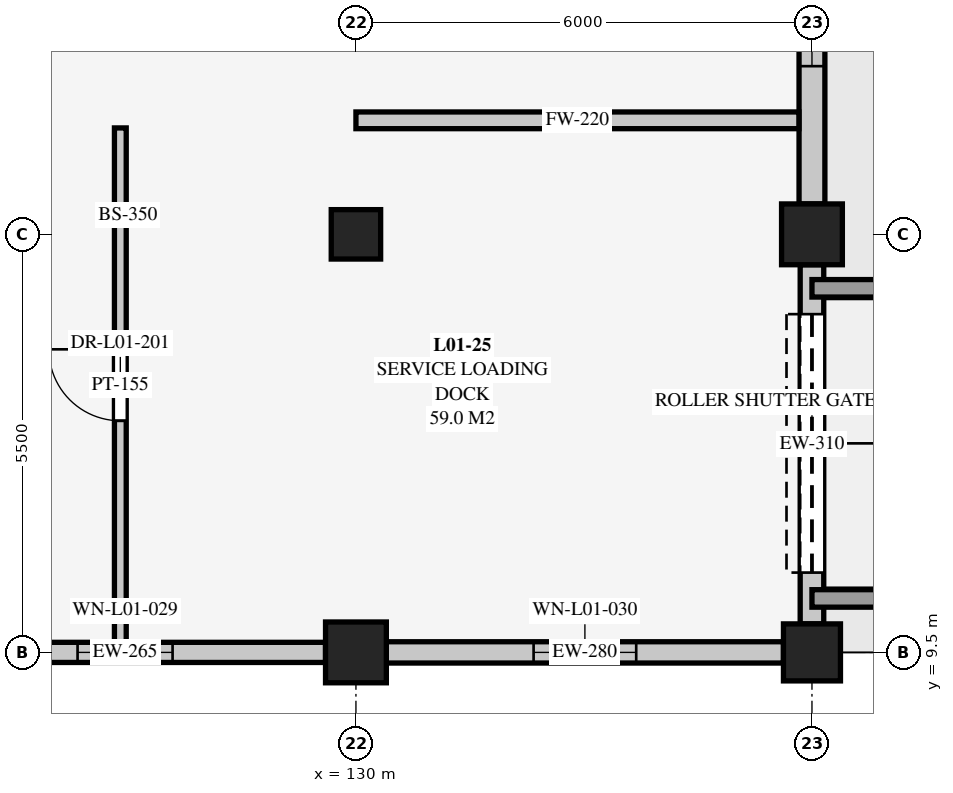
"""IFC4 building model, lengths in metres.
Left out: names, types, materials, properties, quantities, classifications, styles, units other than length and angle.
Written with IfcOpenShell. Run it as: python <this file> out.ifc"""

import sys

from ifc_helpers import new_model, si_unit, direction, frame, frame_2d, origin, origin_2d, place, context, subcontext, project, spatial, rectangle, extrude, element, fill, save


model = new_model("IFC4")
c1 = context("Model", 3, precision=1e-05, world=origin(), true_north=direction((0.0, 1.0)))
c2 = subcontext(c1, "Body", "Model", "MODEL_VIEW")
j1 = project(units=[si_unit("LENGTHUNIT", "METRE"), si_unit("PLANEANGLEUNIT", "RADIAN")], contexts=[c1])
p1 = place(None, origin())
s1 = spatial("IfcSite", under=j1, at=p1, CompositionType="ELEMENT")
p2 = place(p1, origin())
s2 = spatial("IfcBuilding", under=s1, at=p2, CompositionType="ELEMENT")
p3 = place(p2, origin())
s3 = spatial("IfcBuildingStorey", under=s2, at=p3, CompositionType="ELEMENT", Elevation=0.0)
p4 = place(p3, frame((130.0, 9.5, 0.0), z_axis=(0.0, 0.0, 1.0), x_axis=(1.0, 0.0, 0.0)))
e1 = element("IfcColumn", 1, at=p4, inside=s3, PredefinedType="COLUMN", context=c2, shape_type="SweptSolid", body=[
    extrude(rectangle(XDim=0.8, YDim=0.8, at=origin_2d()), origin(), (0.0, 0.0, 1.0), 4.5),
])
p5 = place(p3, frame((130.0, 15.0, 0.0), z_axis=(0.0, 0.0, 1.0), x_axis=(1.0, 0.0, 0.0)))
e2 = element("IfcColumn", 2, at=p5, inside=s3, PredefinedType="COLUMN", context=c2, shape_type="SweptSolid", body=[
    extrude(rectangle(XDim=0.65, YDim=0.65, at=origin_2d()), origin(), (0.0, 0.0, 1.0), 4.5),
])
p6 = place(p3, frame((136.0, 9.5, 0.0), z_axis=(0.0, 0.0, 1.0), x_axis=(1.0, 0.0, 0.0)))
e3 = element("IfcColumn", 3, at=p6, inside=s3, PredefinedType="COLUMN", context=c2, shape_type="SweptSolid", body=[
    extrude(rectangle(XDim=0.75, YDim=0.75, at=origin_2d()), origin(), (0.0, 0.0, 1.0), 4.5),
])
p7 = place(p3, frame((136.0, 15.0, 0.0), z_axis=(0.0, 0.0, 1.0), x_axis=(1.0, 0.0, 0.0)))
e4 = element("IfcColumn", 4, at=p7, inside=s3, PredefinedType="COLUMN", context=c2, shape_type="SweptSolid", body=[
    extrude(rectangle(XDim=0.8, YDim=0.8, at=origin_2d()), origin(), (0.0, 0.0, 1.0), 4.5),
])
p8 = place(p3, frame((129.6, 9.5, 0.0), z_axis=(0.0, 0.0, 1.0), x_axis=(-1.0, 0.0, 0.0)))
e5 = element("IfcWall", 5, at=p8, inside=s3, PredefinedType="SOLIDWALL", context=c2, shape_type="SweptSolid", body=[
    extrude(rectangle(XDim=5.275, YDim=0.265, at=frame_2d((2.638, 0.0))), origin(), (0.0, 0.0, 1.0), 3.821),
])
p9 = place(p8, frame((2.012, 0.0, 0.8)))
e6 = element("IfcOpeningElement", 6, at=p9, cuts=e5, PredefinedType="OPENING", context=c2, shape_type="SweptSolid", body=[
    extrude(rectangle(XDim=1.25, YDim=2.15, at=frame_2d((0.625, 1.075))), frame((0.0, 0.142, 0.0), z_axis=(0.0, -1.0, 0.0), x_axis=(1.0, 0.0, 0.0)), (0.0, 0.0, 1.0), 0.285),
])
p10 = place(p3, frame((135.625, 9.5, 0.0), z_axis=(0.0, 0.0, 1.0), x_axis=(-1.0, 0.0, 0.0)))
e7 = element("IfcWall", 7, at=p10, inside=s3, PredefinedType="SOLIDWALL", context=c2, shape_type="SweptSolid", body=[
    extrude(rectangle(XDim=5.225, YDim=0.28, at=frame_2d((2.613, 0.0))), origin(), (0.0, 0.0, 1.0), 3.821),
])
p11 = place(p10, frame((1.938, 0.0, 0.8)))
e8 = element("IfcOpeningElement", 8, at=p11, cuts=e7, PredefinedType="OPENING", context=c2, shape_type="SweptSolid", body=[
    extrude(rectangle(XDim=1.35, YDim=2.15, at=frame_2d((0.675, 1.075))), frame((0.0, 0.15, 0.0), z_axis=(0.0, -1.0, 0.0), x_axis=(1.0, 0.0, 0.0)), (0.0, 0.0, 1.0), 0.3),
])
p12 = place(p3, frame((136.0, 14.6, 0.0), z_axis=(0.0, 0.0, 1.0), x_axis=(0.0, -1.0, 0.0)))
e9 = element("IfcWall", 9, at=p12, inside=s3, PredefinedType="SOLIDWALL", context=c2, shape_type="SweptSolid", body=[
    extrude(rectangle(XDim=4.725, YDim=0.31, at=frame_2d((2.363, 0.0))), origin(), (0.0, 0.0, 1.0), 3.821),
])
p13 = place(p12, frame((0.65, 0.0, 0.0)))
e10 = element("IfcOpeningElement", 10, at=p13, cuts=e9, PredefinedType="OPENING", context=c2, shape_type="SweptSolid", body=[
    extrude(rectangle(XDim=3.4, YDim=3.15, at=frame_2d((1.7, 1.575))), frame((0.0, 0.165, 0.0), z_axis=(0.0, -1.0, 0.0), x_axis=(1.0, 0.0, 0.0)), (0.0, 0.0, 1.0), 0.33),
])
p14 = place(p3, frame((136.0, 20.675, 0.0), z_axis=(0.0, 0.0, 1.0), x_axis=(0.0, -1.0, 0.0)))
e11 = element("IfcWall", 11, at=p14, inside=s3, PredefinedType="SOLIDWALL", context=c2, shape_type="SweptSolid", body=[
    extrude(rectangle(XDim=5.275, YDim=0.34, at=frame_2d((2.638, 0.0))), origin(), (0.0, 0.0, 1.0), 3.821),
])
p15 = place(p14, frame((1.812, 0.0, 0.75)))
e12 = element("IfcOpeningElement", 12, at=p15, cuts=e11, PredefinedType="OPENING", context=c2, shape_type="SweptSolid", body=[
    extrude(rectangle(XDim=1.65, YDim=2.3, at=frame_2d((0.825, 1.15))), frame((0.0, 0.18, 0.0), z_axis=(0.0, -1.0, 0.0), x_axis=(1.0, 0.0, 0.0)), (0.0, 0.0, 1.0), 0.36),
])
p16 = place(p3, frame((126.9, 9.635, 0.0), z_axis=(0.0, 0.0, 1.0), x_axis=(0.0, 1.0, 0.0)))
e13 = element("IfcWall", 13, at=p16, inside=s3, PredefinedType="PARTITIONING", context=c2, shape_type="SweptSolid", body=[
    extrude(rectangle(XDim=6.765, YDim=0.155, at=frame_2d((3.383, 0.0))), origin(), (0.0, 0.0, 1.0), 4.228),
])
p17 = place(p16, frame((2.913, 0.0, 0.0)))
e14 = element("IfcOpeningElement", 14, at=p17, cuts=e13, PredefinedType="OPENING", context=c2, shape_type="SweptSolid", body=[
    extrude(rectangle(XDim=0.94, YDim=2.1, at=frame_2d((0.47, 1.05))), frame((0.0, 0.088, 0.0), z_axis=(0.0, -1.0, 0.0), x_axis=(1.0, 0.0, 0.0)), (0.0, 0.0, 1.0), 0.175),
])
p18 = place(p3, frame((130.0, 16.5, 0.0), z_axis=(0.0, 0.0, 1.0), x_axis=(1.0, 0.0, 0.0)))
e15 = element("IfcWall", 15, at=p18, inside=s3, PredefinedType="SOLIDWALL", context=c2, shape_type="SweptSolid", body=[
    extrude(rectangle(XDim=5.828, YDim=0.22, at=frame_2d((2.914, 0.0))), origin(), (0.0, 0.0, 1.0), 4.228),
])
for number, where, z_axis, x_axis in (
    (16, (136.0, 10.21, 0.0), (0.0, 0.0, 1.0), (1.0, 0.0, 0.0)),
    (17, (136.0, 14.29, 0.0), (0.0, 0.0, 1.0), (1.0, 0.0, 0.0)),
):
    element("IfcWall", number, at=place(p3, frame(where, z_axis=z_axis, x_axis=x_axis)), inside=s3, PredefinedType="SHEAR", context=c2, shape_type="SweptSolid", body=[
        extrude(rectangle(XDim=12.0, YDim=0.23, at=frame_2d((6.0, 0.0))), origin(), (0.0, 0.0, 1.0), 1.15),
    ])
p19 = place(p9, origin())
e18 = element("IfcWindow", 18, at=p19, inside=s3, PartitioningType="SINGLE_PANEL", PredefinedType="WINDOW", context=c2, shape_type="SweptSolid", body=[
    extrude(rectangle(XDim=1.25, YDim=2.15, at=frame_2d((0.625, 1.075))), frame((0.0, 0.03, 0.0), z_axis=(0.0, -1.0, 0.0), x_axis=(1.0, 0.0, 0.0)), (0.0, 0.0, 1.0), 0.06),
])
fill(e6, e18)
p20 = place(p11, origin())
e19 = element("IfcWindow", 19, at=p20, inside=s3, PartitioningType="SINGLE_PANEL", PredefinedType="WINDOW", context=c2, shape_type="SweptSolid", body=[
    extrude(rectangle(XDim=1.35, YDim=2.15, at=frame_2d((0.675, 1.075))), frame((0.0, 0.03, 0.0), z_axis=(0.0, -1.0, 0.0), x_axis=(1.0, 0.0, 0.0)), (0.0, 0.0, 1.0), 0.06),
])
fill(e8, e19)
p21 = place(p13, origin())
e20 = element("IfcDoor", 20, at=p21, inside=s3, OperationType="ROLLINGUP", PredefinedType="GATE", context=c2, shape_type="SweptSolid", body=[
    extrude(rectangle(XDim=3.4, YDim=3.15, at=frame_2d((1.7, 1.575))), frame((0.0, 0.025, 0.0), z_axis=(0.0, -1.0, 0.0), x_axis=(1.0, 0.0, 0.0)), (0.0, 0.0, 1.0), 0.05),
])
fill(e10, e20)
p22 = place(p15, origin())
e21 = element("IfcWindow", 21, at=p22, inside=s3, PartitioningType="SINGLE_PANEL", PredefinedType="WINDOW", context=c2, shape_type="SweptSolid", body=[
    extrude(rectangle(XDim=1.65, YDim=2.3, at=frame_2d((0.825, 1.15))), frame((0.0, 0.03, 0.0), z_axis=(0.0, -1.0, 0.0), x_axis=(1.0, 0.0, 0.0)), (0.0, 0.0, 1.0), 0.06),
])
fill(e12, e21)
p23 = place(p17, origin())
e22 = element("IfcDoor", 22, at=p23, inside=s3, OperationType="SINGLE_SWING_RIGHT", PredefinedType="DOOR", context=c2, shape_type="SweptSolid", body=[
    extrude(rectangle(XDim=0.94, YDim=2.1, at=frame_2d((0.47, 1.05))), frame((0.0, 0.025, 0.0), z_axis=(0.0, -1.0, 0.0), x_axis=(1.0, 0.0, 0.0)), (0.0, 0.0, 1.0), 0.05),
])
fill(e14, e22)
save(model, sys.argv[1])
